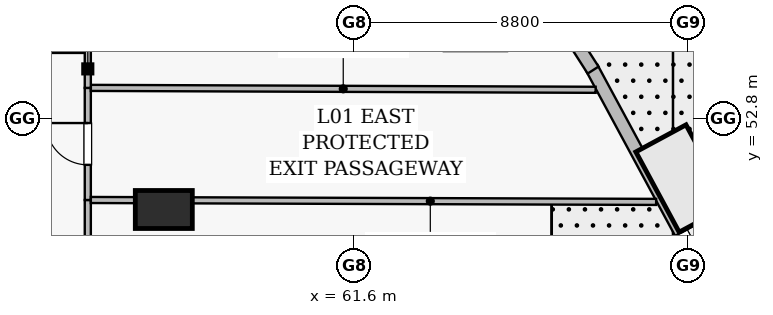
"""IFC4 building model, lengths in metres.
Left out: names, types, materials, properties, quantities, classifications, styles, units other than length and angle.
Written with IfcOpenShell. Run it as: python <this file> out.ifc"""

import sys

from ifc_helpers import new_model, si_unit, direction, frame, frame_2d, origin, origin_2d, place, context, subcontext, project, spatial, rectangle, extrude, element, fill, save


model = new_model("IFC4")
c1 = context("Model", 3, precision=1e-05, world=origin(), true_north=direction((0.0, 1.0)))
c2 = subcontext(c1, "Body", "Model", "MODEL_VIEW")
j1 = project(units=[si_unit("LENGTHUNIT", "METRE"), si_unit("PLANEANGLEUNIT", "RADIAN")], contexts=[c1])
p1 = place(None, origin())
s1 = spatial("IfcSite", under=j1, at=p1, CompositionType="ELEMENT")
p2 = place(p1, origin())
s2 = spatial("IfcBuilding", under=s1, at=p2, CompositionType="ELEMENT")
p3 = place(p2, origin())
s3 = spatial("IfcBuildingStorey", under=s2, at=p3, CompositionType="ELEMENT", Elevation=0.0)
p4 = place(p3, frame((56.6, 50.4, 0.0), z_axis=(0.0, 0.0, 1.0), x_axis=(1.0, 0.0, 0.0)))
e1 = element("IfcColumn", 1, at=p4, inside=s3, PredefinedType="COLUMN", context=c2, shape_type="SweptSolid", body=[
    extrude(rectangle(XDim=1.5, YDim=1.0, at=origin_2d()), origin(), (0.0, 0.0, 1.0), 4.8),
])
p5 = place(p3, frame((71.374, 47.619, 0.0), z_axis=(0.0, 0.0, 1.0), x_axis=(-0.474967489697, 0.880003343022, 0.0)))
e2 = element("IfcWall", 2, at=p5, inside=s3, PredefinedType="SOLIDWALL", context=c2, shape_type="SweptSolid", body=[
    extrude(rectangle(XDim=7.398, YDim=0.34, at=frame_2d((3.699, 0.0))), origin(), (0.0, 0.0, 1.0), 4.5),
])
p6 = place(p5, frame((0.664, 0.0, 0.0)))
e3 = element("IfcOpeningElement", 3, at=p6, cuts=e2, PredefinedType="OPENING", context=c2, shape_type="SweptSolid", body=[
    extrude(rectangle(XDim=1.8, YDim=2.25, at=frame_2d((0.9, 1.125))), frame((0.0, 0.18, 0.0), z_axis=(0.0, -1.0, 0.0), x_axis=(1.0, 0.0, 0.0)), (0.0, 0.0, 1.0), 0.36),
])
p7 = place(p3, frame((67.896, 54.069, 0.0), z_axis=(0.0, 0.0, 1.0), x_axis=(-0.539522772187, 0.841971007987, 0.0)))
e4 = element("IfcWall", 4, at=p7, inside=s3, PredefinedType="SOLIDWALL", context=c2, shape_type="SweptSolid", body=[
    extrude(rectangle(XDim=7.398, YDim=0.34, at=frame_2d((3.699, 0.0))), origin(), (0.0, 0.0, 1.0), 4.5),
])
p8 = place(p7, frame((2.799, 0.0, 0.0)))
e5 = element("IfcOpeningElement", 5, at=p8, cuts=e4, PredefinedType="OPENING", context=c2, shape_type="SweptSolid", body=[
    extrude(rectangle(XDim=1.8, YDim=2.25, at=frame_2d((0.9, 1.125))), frame((0.0, 0.18, 0.0), z_axis=(0.0, -1.0, 0.0), x_axis=(1.0, 0.0, 0.0)), (0.0, 0.0, 1.0), 0.36),
])
p9 = place(p3, frame((54.6, 33.4, 0.0), z_axis=(0.0, 0.0, 1.0), x_axis=(0.0, 1.0, 0.0)))
e6 = element("IfcWall", 6, at=p9, inside=s3, PredefinedType="SOLIDWALL", context=c2, shape_type="SweptSolid", body=[
    extrude(rectangle(XDim=17.25, YDim=0.16, at=frame_2d((8.625, 0.0))), origin(), (0.0, 0.0, 1.0), 3.9),
])
p10 = place(p9, frame((8.075, 0.0, 0.0)))
e7 = element("IfcOpeningElement", 7, at=p10, cuts=e6, PredefinedType="OPENING", context=c2, shape_type="SweptSolid", body=[
    extrude(rectangle(XDim=1.1, YDim=2.15, at=frame_2d((0.55, 1.075))), frame((0.0, 0.09, 0.0), z_axis=(0.0, -1.0, 0.0), x_axis=(1.0, 0.0, 0.0)), (0.0, 0.0, 1.0), 0.18),
])
p11 = place(p3, frame((54.52, 54.6, 0.0), z_axis=(0.0, 0.0, 1.0), x_axis=(-1.0, 0.0, 0.0)))
e8 = element("IfcWall", 8, at=p11, inside=s3, PredefinedType="SOLIDWALL", context=c2, shape_type="SweptSolid", body=[
    extrude(rectangle(XDim=14.44, YDim=0.16, at=frame_2d((7.22, 0.0))), origin(), (0.0, 0.0, 1.0), 3.9),
])
p12 = place(p11, frame((6.67, 0.0, 0.0)))
e9 = element("IfcOpeningElement", 9, at=p12, cuts=e8, PredefinedType="OPENING", context=c2, shape_type="SweptSolid", body=[
    extrude(rectangle(XDim=1.1, YDim=2.15, at=frame_2d((0.55, 1.075))), frame((0.0, 0.09, 0.0), z_axis=(0.0, -1.0, 0.0), x_axis=(1.0, 0.0, 0.0)), (0.0, 0.0, 1.0), 0.18),
])
p13 = place(p3, frame((54.6, 50.65, 0.0), z_axis=(0.0, 0.0, 1.0), x_axis=(0.0, 1.0, 0.0)))
e10 = element("IfcWall", 10, at=p13, inside=s3, PredefinedType="SOLIDWALL", context=c2, shape_type="SweptSolid", body=[
    extrude(rectangle(XDim=2.95, YDim=0.16, at=frame_2d((1.475, 0.0))), origin(), (0.0, 0.0, 1.0), 3.9),
])
p14 = place(p13, frame((0.925, 0.0, 0.0)))
e11 = element("IfcOpeningElement", 11, at=p14, cuts=e10, PredefinedType="OPENING", context=c2, shape_type="SweptSolid", body=[
    extrude(rectangle(XDim=1.1, YDim=2.15, at=frame_2d((0.55, 1.075))), frame((0.0, 0.09, 0.0), z_axis=(0.0, -1.0, 0.0), x_axis=(1.0, 0.0, 0.0)), (0.0, 0.0, 1.0), 0.18),
])
p15 = place(p3, frame((54.68, 50.65, 0.0), z_axis=(0.0, 0.0, 1.0), x_axis=(0.999994394778, -0.003348195518, 0.0)))
e12 = element("IfcWall", 12, at=p15, inside=s3, PredefinedType="SOLIDWALL", context=c2, shape_type="SweptSolid", body=[
    extrude(rectangle(XDim=14.875, YDim=0.16, at=frame_2d((7.438, 0.0))), origin(), (0.0, 0.0, 1.0), 3.688),
])
p16 = place(p3, frame((67.963, 53.55, 0.0), z_axis=(0.0, 0.0, 1.0), x_axis=(-0.99999290155, 0.003767870767, 0.0)))
e13 = element("IfcWall", 13, at=p16, inside=s3, PredefinedType="SOLIDWALL", context=c2, shape_type="SweptSolid", body=[
    extrude(rectangle(XDim=13.283, YDim=0.16, at=frame_2d((6.642, 0.0))), origin(), (0.0, 0.0, 1.0), 3.688),
])
p17 = place(p3, frame((54.6, 53.6, 0.0), z_axis=(0.0, 0.0, 1.0), x_axis=(0.0, 1.0, 0.0)))
e14 = element("IfcWall", 14, at=p17, inside=s3, PredefinedType="SOLIDWALL", context=c2, shape_type="SweptSolid", body=[
    extrude(rectangle(XDim=1.0, YDim=0.16, at=frame_2d((0.5, 0.0))), origin(), (0.0, 0.0, 1.0), 4.5),
])
p18 = place(p6, frame((1.8, 0.0, 0.0), z_axis=(0.0, 0.0, 1.0), x_axis=(-1.0, 0.0, 0.0)))
e15 = element("IfcDoor", 15, at=p18, inside=s3, OperationType="DOUBLE_DOOR_SINGLE_SWING", PredefinedType="DOOR", context=c2, shape_type="SweptSolid", body=[
    extrude(rectangle(XDim=1.8, YDim=2.25, at=frame_2d((0.9, 1.125))), frame((0.0, 0.025, 0.0), z_axis=(0.0, -1.0, 0.0), x_axis=(1.0, 0.0, 0.0)), (0.0, 0.0, 1.0), 0.05),
])
fill(e3, e15)
p19 = place(p14, origin())
e16 = element("IfcDoor", 16, at=p19, inside=s3, OperationType="SINGLE_SWING_RIGHT", PredefinedType="DOOR", context=c2, shape_type="SweptSolid", body=[
    extrude(rectangle(XDim=1.1, YDim=2.15, at=frame_2d((0.55, 1.075))), frame((0.0, 0.025, 0.0), z_axis=(0.0, -1.0, 0.0), x_axis=(1.0, 0.0, 0.0)), (0.0, 0.0, 1.0), 0.05),
])
fill(e11, e16)
save(model, sys.argv[1])
